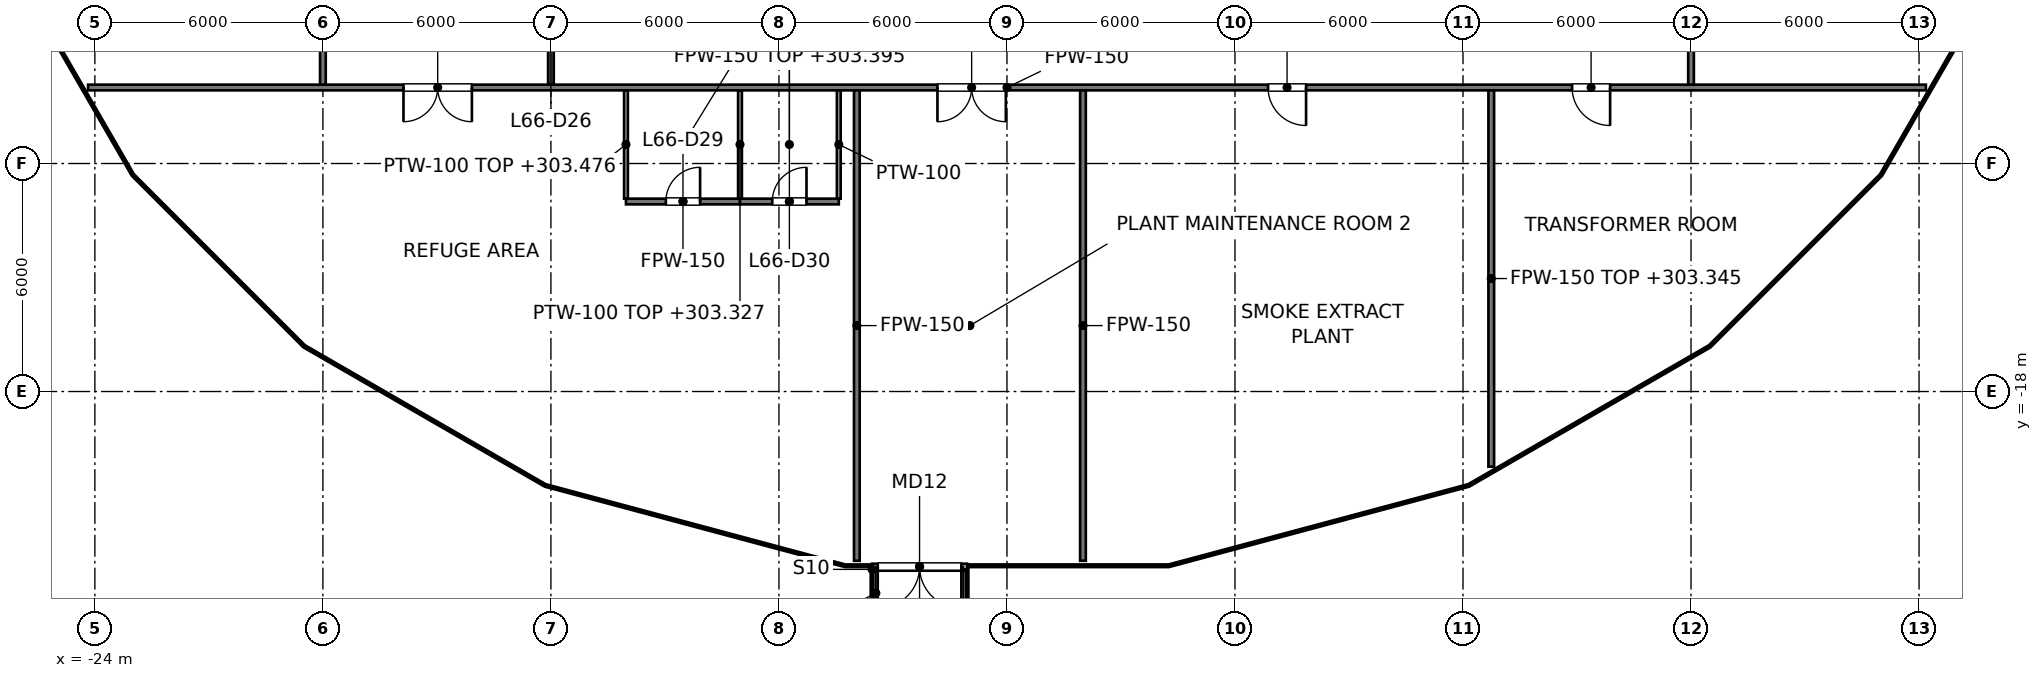
"""IFC4 building model, lengths in metres.
Left out: names, types, materials, properties, quantities, classifications, styles, units other than length and angle.
Written with IfcOpenShell. Run it as: python <this file> out.ifc"""

import sys

from ifc_helpers import new_model, si_unit, direction, frame, frame_2d, origin, place, context, subcontext, project, spatial, rectangle, extrude, element, fill, save


model = new_model("IFC4")
c1 = context("Model", 3, precision=1e-05, world=origin(), true_north=direction((0.0, 1.0)))
c2 = subcontext(c1, "Body", "Model", "MODEL_VIEW")
j1 = project(units=[si_unit("LENGTHUNIT", "METRE"), si_unit("PLANEANGLEUNIT", "RADIAN")], contexts=[c1])
p1 = place(None, origin())
s1 = spatial("IfcSite", under=j1, at=p1, CompositionType="ELEMENT")
p2 = place(p1, origin())
s2 = spatial("IfcBuilding", under=s1, at=p2, CompositionType="ELEMENT")
p3 = place(p2, frame((0.0, 0.0, 299.0)))
s3 = spatial("IfcBuildingStorey", under=s2, at=p3, CompositionType="ELEMENT", Elevation=299.0)
p4 = place(p3, frame((-1.05, -22.605, 0.0), z_axis=(0.0, 0.0, 1.0), x_axis=(-1.0, 0.0, 0.0)))
e1 = element("IfcWall", 1, at=p4, inside=s3, PredefinedType="SOLIDWALL", context=c2, shape_type="SweptSolid", body=[
    extrude(rectangle(XDim=2.5, YDim=0.15, at=frame_2d((1.25, 0.0))), origin(), (0.0, 0.0, 1.0), 2.5),
])
p5 = place(p4, frame((0.15, 0.0, 0.0)))
e2 = element("IfcOpeningElement", 2, at=p5, cuts=e1, PredefinedType="OPENING", context=c2, shape_type="SweptSolid", body=[
    extrude(rectangle(XDim=2.2, YDim=2.1, at=frame_2d((1.1, 1.05))), frame((0.0, 0.075, 0.0), z_axis=(0.0, -1.0, 0.0), x_axis=(1.0, 0.0, 0.0)), (0.0, 0.0, 1.0), 0.15),
])
p6 = place(p3, frame((-24.179, -10.0, 0.0), z_axis=(0.0, 0.0, 1.0), x_axis=(1.0, 0.0, 0.0)))
e3 = element("IfcWall", 3, at=p6, inside=s3, PredefinedType="PARTITIONING", context=c2, shape_type="SweptSolid", body=[
    extrude(rectangle(XDim=48.359, YDim=0.15, at=frame_2d((24.179, 0.0))), origin(), (0.0, 0.0, 1.0), 4.327),
])
p7 = place(p6, frame((31.05, 0.0, 0.0)))
e4 = element("IfcOpeningElement", 4, at=p7, cuts=e3, PredefinedType="OPENING", context=c2, shape_type="SweptSolid", body=[
    extrude(rectangle(XDim=1.0, YDim=2.1, at=frame_2d((0.5, 1.05))), frame((0.0, 0.075, 0.0), z_axis=(0.0, -1.0, 0.0), x_axis=(1.0, 0.0, 0.0)), (0.0, 0.0, 1.0), 0.15),
])
p8 = place(p6, frame((39.05, 0.0, 0.0)))
e5 = element("IfcOpeningElement", 5, at=p8, cuts=e3, PredefinedType="OPENING", context=c2, shape_type="SweptSolid", body=[
    extrude(rectangle(XDim=1.0, YDim=2.1, at=frame_2d((0.5, 1.05))), frame((0.0, 0.075, 0.0), z_axis=(0.0, -1.0, 0.0), x_axis=(1.0, 0.0, 0.0)), (0.0, 0.0, 1.0), 0.15),
])
p9 = place(p6, frame((8.3, 0.0, 0.0)))
e6 = element("IfcOpeningElement", 6, at=p9, cuts=e3, PredefinedType="OPENING", context=c2, shape_type="SweptSolid", body=[
    extrude(rectangle(XDim=1.8, YDim=2.1, at=frame_2d((0.9, 1.05))), frame((0.0, 0.075, 0.0), z_axis=(0.0, -1.0, 0.0), x_axis=(1.0, 0.0, 0.0)), (0.0, 0.0, 1.0), 0.15),
])
p10 = place(p6, frame((22.35, 0.0, 0.0)))
e7 = element("IfcOpeningElement", 7, at=p10, cuts=e3, PredefinedType="OPENING", context=c2, shape_type="SweptSolid", body=[
    extrude(rectangle(XDim=1.8, YDim=2.1, at=frame_2d((0.9, 1.05))), frame((0.0, 0.075, 0.0), z_axis=(0.0, -1.0, 0.0), x_axis=(1.0, 0.0, 0.0)), (0.0, 0.0, 1.0), 0.15),
])
p11 = place(p3, frame((18.0, -9.925, 0.0), z_axis=(0.0, 0.0, 1.0), x_axis=(0.0, 1.0, 0.0)))
e8 = element("IfcWall", 8, at=p11, inside=s3, PredefinedType="PARTITIONING", context=c2, shape_type="SweptSolid", body=[
    extrude(rectangle(XDim=19.85, YDim=0.15, at=frame_2d((9.925, 0.0))), origin(), (0.0, 0.0, 1.0), 4.277),
])
p12 = place(p11, frame((5.7, 0.0, 0.0)))
e9 = element("IfcOpeningElement", 9, at=p12, cuts=e8, PredefinedType="OPENING", context=c2, shape_type="SweptSolid", body=[
    extrude(rectangle(XDim=1.0, YDim=2.1, at=frame_2d((0.5, 1.05))), frame((0.0, 0.075, 0.0), z_axis=(0.0, -1.0, 0.0), x_axis=(1.0, 0.0, 0.0)), (0.0, 0.0, 1.0), 0.15),
])
p13 = place(p11, frame((15.675, 0.0, 0.0)))
e10 = element("IfcOpeningElement", 10, at=p13, cuts=e8, PredefinedType="OPENING", context=c2, shape_type="SweptSolid", body=[
    extrude(rectangle(XDim=1.0, YDim=2.1, at=frame_2d((0.5, 1.05))), frame((0.0, 0.075, 0.0), z_axis=(0.0, -1.0, 0.0), x_axis=(1.0, 0.0, 0.0)), (0.0, 0.0, 1.0), 0.15),
])
p14 = place(p3, frame((-18.0, -9.925, 0.0), z_axis=(0.0, 0.0, 1.0), x_axis=(0.0, 1.0, 0.0)))
e11 = element("IfcWall", 11, at=p14, inside=s3, PredefinedType="PARTITIONING", context=c2, shape_type="SweptSolid", body=[
    extrude(rectangle(XDim=19.85, YDim=0.15, at=frame_2d((9.925, 0.0))), origin(), (0.0, 0.0, 1.0), 4.327),
])
p15 = place(p14, frame((9.2, 0.0, 0.0)))
e12 = element("IfcOpeningElement", 12, at=p15, cuts=e11, PredefinedType="OPENING", context=c2, shape_type="SweptSolid", body=[
    extrude(rectangle(XDim=1.0, YDim=2.1, at=frame_2d((0.5, 1.05))), frame((0.0, 0.075, 0.0), z_axis=(0.0, -1.0, 0.0), x_axis=(1.0, 0.0, 0.0)), (0.0, 0.0, 1.0), 0.15),
])
p16 = place(p14, frame((15.675, 0.0, 0.0)))
e13 = element("IfcOpeningElement", 13, at=p16, cuts=e11, PredefinedType="OPENING", context=c2, shape_type="SweptSolid", body=[
    extrude(rectangle(XDim=1.0, YDim=2.1, at=frame_2d((0.5, 1.05))), frame((0.0, 0.075, 0.0), z_axis=(0.0, -1.0, 0.0), x_axis=(1.0, 0.0, 0.0)), (0.0, 0.0, 1.0), 0.15),
])
for number, where, z_axis, x_axis in (
    (14, (-3.95, -10.075, 0.0), (0.0, 0.0, 1.0), (0.0, -1.0, 0.0)),
    (15, (2.0, -10.075, 0.0), (0.0, 0.0, 1.0), (0.0, -1.0, 0.0)),
):
    element("IfcWall", number, at=place(p3, frame(where, z_axis=z_axis, x_axis=x_axis)), inside=s3, PredefinedType="PARTITIONING", context=c2, shape_type="SweptSolid", body=[
        extrude(rectangle(XDim=12.38, YDim=0.15, at=frame_2d((6.19, 0.0))), origin(), (0.0, 0.0, 1.0), 4.327),
    ])
p17 = place(p3, frame((-12.0, -5.5, 0.0), z_axis=(0.0, 0.0, 1.0), x_axis=(0.0, -1.0, 0.0)))
e16 = element("IfcWall", 16, at=p17, inside=s3, PredefinedType="PARTITIONING", context=c2, shape_type="SweptSolid", body=[
    extrude(rectangle(XDim=4.425, YDim=0.15, at=frame_2d((2.212, 0.0))), origin(), (0.0, 0.0, 1.0), 4.476),
])
p18 = place(p17, frame((1.613, 0.0, 0.0)))
e17 = element("IfcOpeningElement", 17, at=p18, cuts=e16, PredefinedType="OPENING", context=c2, shape_type="SweptSolid", body=[
    extrude(rectangle(XDim=1.8, YDim=2.1, at=frame_2d((0.9, 1.05))), frame((0.0, 0.075, 0.0), z_axis=(0.0, -1.0, 0.0), x_axis=(1.0, 0.0, 0.0)), (0.0, 0.0, 1.0), 0.15),
])
p19 = place(p3, frame((12.743, -10.075, 0.0), z_axis=(0.0, 0.0, 1.0), x_axis=(0.0, -1.0, 0.0)))
e18 = element("IfcWall", 18, at=p19, inside=s3, PredefinedType="PARTITIONING", context=c2, shape_type="SweptSolid", body=[
    extrude(rectangle(XDim=9.904, YDim=0.15, at=frame_2d((4.952, 0.0))), origin(), (0.0, 0.0, 1.0), 4.345),
])
p20 = place(p3, frame((-10.025, -13.0, 0.0), z_axis=(0.0, 0.0, 1.0), x_axis=(1.0, 0.0, 0.0)))
e19 = element("IfcWall", 19, at=p20, inside=s3, PredefinedType="PARTITIONING", context=c2, shape_type="SweptSolid", body=[
    extrude(rectangle(XDim=3.0, YDim=0.15, at=frame_2d((1.5, 0.0))), origin(), (0.0, 0.0, 1.0), 4.327),
])
p21 = place(p20, frame((1.05, 0.0, 0.0)))
e20 = element("IfcOpeningElement", 20, at=p21, cuts=e19, PredefinedType="OPENING", context=c2, shape_type="SweptSolid", body=[
    extrude(rectangle(XDim=0.9, YDim=2.1, at=frame_2d((0.45, 1.05))), frame((0.0, 0.075, 0.0), z_axis=(0.0, -1.0, 0.0), x_axis=(1.0, 0.0, 0.0)), (0.0, 0.0, 1.0), 0.15),
])
p22 = place(p3, frame((-7.025, -13.0, 0.0), z_axis=(0.0, 0.0, 1.0), x_axis=(1.0, 0.0, 0.0)))
e21 = element("IfcWall", 21, at=p22, inside=s3, PredefinedType="PARTITIONING", context=c2, shape_type="SweptSolid", body=[
    extrude(rectangle(XDim=2.6, YDim=0.15, at=frame_2d((1.3, 0.0))), origin(), (0.0, 0.0, 1.0), 4.395),
])
p23 = place(p22, frame((0.85, 0.0, 0.0)))
e22 = element("IfcOpeningElement", 22, at=p23, cuts=e21, PredefinedType="OPENING", context=c2, shape_type="SweptSolid", body=[
    extrude(rectangle(XDim=0.9, YDim=2.1, at=frame_2d((0.45, 1.05))), frame((0.0, 0.075, 0.0), z_axis=(0.0, -1.0, 0.0), x_axis=(1.0, 0.0, 0.0)), (0.0, 0.0, 1.0), 0.15),
])
p24 = place(p3, frame((-10.025, -12.925, 0.0), z_axis=(0.0, 0.0, 1.0), x_axis=(0.0, 1.0, 0.0)))
e23 = element("IfcWall", 23, at=p24, inside=s3, PredefinedType="PARTITIONING", context=c2, shape_type="SweptSolid", body=[
    extrude(rectangle(XDim=2.85, YDim=0.1, at=frame_2d((1.425, 0.0))), origin(), (0.0, 0.0, 1.0), 4.476),
])
p25 = place(p3, frame((-7.025, -12.925, 0.0), z_axis=(0.0, 0.0, 1.0), x_axis=(0.0, 1.0, 0.0)))
e24 = element("IfcWall", 24, at=p25, inside=s3, PredefinedType="PARTITIONING", context=c2, shape_type="SweptSolid", body=[
    extrude(rectangle(XDim=2.85, YDim=0.1, at=frame_2d((1.425, 0.0))), origin(), (0.0, 0.0, 1.0), 4.327),
])
p26 = place(p3, frame((-4.425, -12.925, 0.0), z_axis=(0.0, 0.0, 1.0), x_axis=(0.0, 1.0, 0.0)))
e25 = element("IfcWall", 25, at=p26, inside=s3, PredefinedType="PARTITIONING", context=c2, shape_type="SweptSolid", body=[
    extrude(rectangle(XDim=2.85, YDim=0.1, at=frame_2d((1.425, 0.0))), origin(), (0.0, 0.0, 1.0), 4.395),
])
p27 = place(p5, origin())
e26 = element("IfcDoor", 26, at=p27, inside=s3, OperationType="DOUBLE_DOOR_SINGLE_SWING", PredefinedType="DOOR", context=c2, shape_type="SweptSolid", body=[
    extrude(rectangle(XDim=2.2, YDim=2.1, at=frame_2d((1.1, 1.05))), frame((0.0, 0.025, 0.0), z_axis=(0.0, -1.0, 0.0), x_axis=(1.0, 0.0, 0.0)), (0.0, 0.0, 1.0), 0.05),
])
fill(e2, e26)
p28 = place(p7, origin())
e27 = element("IfcDoor", 27, at=p28, inside=s3, OperationType="SINGLE_SWING_RIGHT", PredefinedType="DOOR", context=c2, shape_type="SweptSolid", body=[
    extrude(rectangle(XDim=1.0, YDim=2.1, at=frame_2d((0.5, 1.05))), frame((0.0, 0.025, 0.0), z_axis=(0.0, -1.0, 0.0), x_axis=(1.0, 0.0, 0.0)), (0.0, 0.0, 1.0), 0.05),
])
fill(e4, e27)
p29 = place(p8, origin())
e28 = element("IfcDoor", 28, at=p29, inside=s3, OperationType="SINGLE_SWING_RIGHT", PredefinedType="DOOR", context=c2, shape_type="SweptSolid", body=[
    extrude(rectangle(XDim=1.0, YDim=2.1, at=frame_2d((0.5, 1.05))), frame((0.0, 0.025, 0.0), z_axis=(0.0, -1.0, 0.0), x_axis=(1.0, 0.0, 0.0)), (0.0, 0.0, 1.0), 0.05),
])
fill(e5, e28)
p30 = place(p9, origin())
e29 = element("IfcDoor", 29, at=p30, inside=s3, OperationType="DOUBLE_DOOR_SINGLE_SWING", PredefinedType="DOOR", context=c2, shape_type="SweptSolid", body=[
    extrude(rectangle(XDim=1.8, YDim=2.1, at=frame_2d((0.9, 1.05))), frame((0.0, 0.025, 0.0), z_axis=(0.0, -1.0, 0.0), x_axis=(1.0, 0.0, 0.0)), (0.0, 0.0, 1.0), 0.05),
])
fill(e6, e29)
p31 = place(p21, origin())
e30 = element("IfcDoor", 30, at=p31, inside=s3, OperationType="SINGLE_SWING_RIGHT", PredefinedType="DOOR", context=c2, shape_type="SweptSolid", body=[
    extrude(rectangle(XDim=0.9, YDim=2.1, at=frame_2d((0.45, 1.05))), frame((0.0, 0.025, 0.0), z_axis=(0.0, -1.0, 0.0), x_axis=(1.0, 0.0, 0.0)), (0.0, 0.0, 1.0), 0.05),
])
fill(e20, e30)
p32 = place(p23, origin())
e31 = element("IfcDoor", 31, at=p32, inside=s3, OperationType="SINGLE_SWING_RIGHT", PredefinedType="DOOR", context=c2, shape_type="SweptSolid", body=[
    extrude(rectangle(XDim=0.9, YDim=2.1, at=frame_2d((0.45, 1.05))), frame((0.0, 0.025, 0.0), z_axis=(0.0, -1.0, 0.0), x_axis=(1.0, 0.0, 0.0)), (0.0, 0.0, 1.0), 0.05),
])
fill(e22, e31)
p33 = place(p10, origin())
e32 = element("IfcDoor", 32, at=p33, inside=s3, OperationType="DOUBLE_DOOR_SINGLE_SWING", PredefinedType="DOOR", context=c2, shape_type="SweptSolid", body=[
    extrude(rectangle(XDim=1.8, YDim=2.1, at=frame_2d((0.9, 1.05))), frame((0.0, 0.025, 0.0), z_axis=(0.0, -1.0, 0.0), x_axis=(1.0, 0.0, 0.0)), (0.0, 0.0, 1.0), 0.05),
])
fill(e7, e32)
save(model, sys.argv[1])
